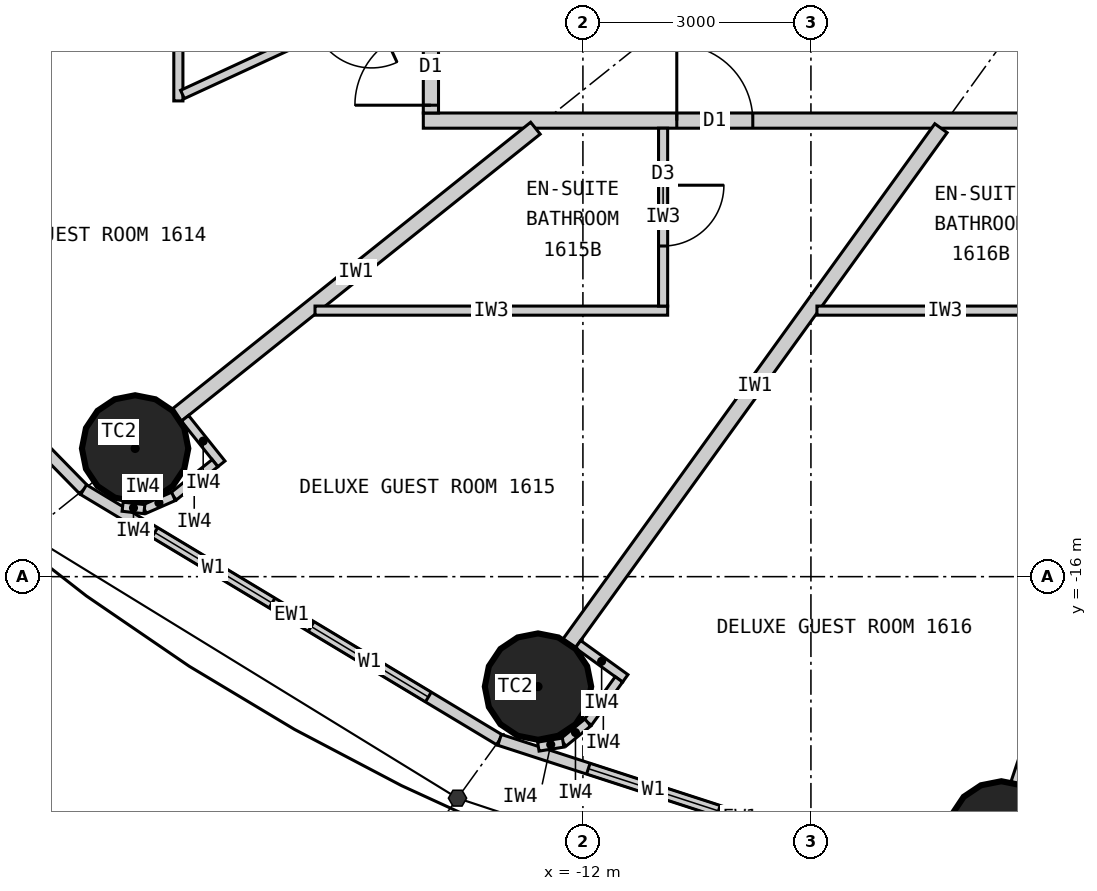
"""IFC4 building model, lengths in metres.
Left out: names, types, materials, properties, quantities, classifications, styles, units other than length and angle.
Written with IfcOpenShell. Run it as: python <this file> out.ifc"""

import sys

from ifc_helpers import new_model, si_unit, direction, frame, frame_2d, origin, origin_2d, place, context, subcontext, project, spatial, rectangle, circle, extrude, element, fill, save


model = new_model("IFC4")
c1 = context("Model", 3, precision=1e-05, world=origin(), true_north=direction((0.0, 1.0)))
c2 = subcontext(c1, "Body", "Model", "MODEL_VIEW")
j1 = project(units=[si_unit("LENGTHUNIT", "METRE"), si_unit("PLANEANGLEUNIT", "RADIAN")], contexts=[c1])
p1 = place(None, origin())
s1 = spatial("IfcSite", under=j1, at=p1, CompositionType="ELEMENT")
p2 = place(p1, origin())
s2 = spatial("IfcBuilding", under=s1, at=p2, CompositionType="ELEMENT")
p3 = place(p2, frame((0.0, 0.0, 67.2)))
s3 = spatial("IfcBuildingStorey", under=s2, at=p3, CompositionType="ELEMENT", Elevation=67.2)
for number, where, z_axis, x_axis in (
    (1, (-17.892, -14.313, 0.0), (0.0, 0.0, 1.0), (1.0, 0.0, 0.0)),
    (2, (-12.591, -17.447, 0.0), (0.0, 0.0, 1.0), (1.0, 0.0, 0.0)),
    (3, (-6.495, -19.391, 0.0), (0.0, 0.0, 1.0), (1.0, 0.0, 0.0)),
):
    element("IfcColumn", number, at=place(p3, frame(where, z_axis=z_axis, x_axis=x_axis)), inside=s3, PredefinedType="COLUMN", context=c2, shape_type="SweptSolid", body=[
        extrude(circle(Radius=0.7, at=origin_2d()), origin(), (0.0, 0.0, 1.0), 3.3),
    ])
p4 = place(p3, frame((-22.803, -10.532, 0.0), z_axis=(0.0, 0.0, 1.0), x_axis=(0.699602905915, -0.714531856557, 0.0)))
e4 = element("IfcWall", 4, at=p4, inside=s3, PredefinedType="ELEMENTEDWALL", context=c2, shape_type="SweptSolid", body=[
    extrude(rectangle(XDim=6.051, YDim=0.15, at=frame_2d((3.025, 0.0))), origin(), (0.0, 0.0, 1.0), 3.12),
])
p5 = place(p4, frame((0.926, 0.0, 0.9)))
e5 = element("IfcOpeningElement", 5, at=p5, cuts=e4, PredefinedType="OPENING", context=c2, shape_type="SweptSolid", body=[
    extrude(rectangle(XDim=1.8, YDim=1.9, at=frame_2d((0.9, 0.95))), frame((0.0, 0.085, 0.0), z_axis=(0.0, -1.0, 0.0), x_axis=(1.0, 0.0, 0.0)), (0.0, 0.0, 1.0), 0.17),
])
p6 = place(p4, frame((3.325, 0.0, 0.9)))
e6 = element("IfcOpeningElement", 6, at=p6, cuts=e4, PredefinedType="OPENING", context=c2, shape_type="SweptSolid", body=[
    extrude(rectangle(XDim=1.8, YDim=1.9, at=frame_2d((0.9, 0.95))), frame((0.0, 0.085, 0.0), z_axis=(0.0, -1.0, 0.0), x_axis=(1.0, 0.0, 0.0)), (0.0, 0.0, 1.0), 0.17),
])
p7 = place(p3, frame((-18.57, -14.856, 0.0), z_axis=(0.0, 0.0, 1.0), x_axis=(0.856983180864, -0.515344377787, 0.0)))
e7 = element("IfcWall", 7, at=p7, inside=s3, PredefinedType="ELEMENTEDWALL", context=c2, shape_type="SweptSolid", body=[
    extrude(rectangle(XDim=6.386, YDim=0.15, at=frame_2d((3.193, 0.0))), origin(), (0.0, 0.0, 1.0), 3.12),
])
p8 = place(p7, frame((1.093, 0.0, 0.9)))
e8 = element("IfcOpeningElement", 8, at=p8, cuts=e7, PredefinedType="OPENING", context=c2, shape_type="SweptSolid", body=[
    extrude(rectangle(XDim=1.8, YDim=1.9, at=frame_2d((0.9, 0.95))), frame((0.0, 0.085, 0.0), z_axis=(0.0, -1.0, 0.0), x_axis=(1.0, 0.0, 0.0)), (0.0, 0.0, 1.0), 0.17),
])
p9 = place(p7, frame((3.493, 0.0, 0.9)))
e9 = element("IfcOpeningElement", 9, at=p9, cuts=e7, PredefinedType="OPENING", context=c2, shape_type="SweptSolid", body=[
    extrude(rectangle(XDim=1.8, YDim=1.9, at=frame_2d((0.9, 0.95))), frame((0.0, 0.085, 0.0), z_axis=(0.0, -1.0, 0.0), x_axis=(1.0, 0.0, 0.0)), (0.0, 0.0, 1.0), 0.17),
])
p10 = place(p3, frame((-13.096, -18.147, 0.0), z_axis=(0.0, 0.0, 1.0), x_axis=(0.951137534625, -0.308767534285, 0.0)))
e10 = element("IfcWall", 10, at=p10, inside=s3, PredefinedType="ELEMENTEDWALL", context=c2, shape_type="SweptSolid", body=[
    extrude(rectangle(XDim=6.655, YDim=0.15, at=frame_2d((3.328, 0.0))), origin(), (0.0, 0.0, 1.0), 3.12),
])
p11 = place(p10, frame((1.228, 0.0, 0.9)))
e11 = element("IfcOpeningElement", 11, at=p11, cuts=e10, PredefinedType="OPENING", context=c2, shape_type="SweptSolid", body=[
    extrude(rectangle(XDim=1.8, YDim=1.9, at=frame_2d((0.9, 0.95))), frame((0.0, 0.085, 0.0), z_axis=(0.0, -1.0, 0.0), x_axis=(1.0, 0.0, 0.0)), (0.0, 0.0, 1.0), 0.17),
])
p12 = place(p10, frame((3.628, 0.0, 0.9)))
e12 = element("IfcOpeningElement", 12, at=p12, cuts=e10, PredefinedType="OPENING", context=c2, shape_type="SweptSolid", body=[
    extrude(rectangle(XDim=1.8, YDim=1.9, at=frame_2d((0.9, 0.95))), frame((0.0, 0.085, 0.0), z_axis=(0.0, -1.0, 0.0), x_axis=(1.0, 0.0, 0.0)), (0.0, 0.0, 1.0), 0.17),
])
p13 = place(p3, frame((14.1, -10.0, 0.0), z_axis=(0.0, 0.0, 1.0), x_axis=(-1.0, 0.0, 0.0)))
e13 = element("IfcWall", 13, at=p13, inside=s3, PredefinedType="PARTITIONING", context=c2, shape_type="SweptSolid", body=[
    extrude(rectangle(XDim=28.2, YDim=0.2, at=frame_2d((14.1, 0.0))), origin(), (0.0, 0.0, 1.0), 3.12),
])
p14 = place(p13, frame((23.865, 0.0, 0.0)))
e14 = element("IfcOpeningElement", 14, at=p14, cuts=e13, PredefinedType="OPENING", context=c2, shape_type="SweptSolid", body=[
    extrude(rectangle(XDim=1.0, YDim=2.2, at=frame_2d((0.5, 1.1))), frame((0.0, 0.11, 0.0), z_axis=(0.0, -1.0, 0.0), x_axis=(1.0, 0.0, 0.0)), (0.0, 0.0, 1.0), 0.22),
])
p15 = place(p13, frame((18.529, 0.0, 0.0)))
e15 = element("IfcOpeningElement", 15, at=p15, cuts=e13, PredefinedType="OPENING", context=c2, shape_type="SweptSolid", body=[
    extrude(rectangle(XDim=1.0, YDim=2.2, at=frame_2d((0.5, 1.1))), frame((0.0, 0.11, 0.0), z_axis=(0.0, -1.0, 0.0), x_axis=(1.0, 0.0, 0.0)), (0.0, 0.0, 1.0), 0.22),
])
p16 = place(p13, frame((14.623, 0.0, 0.0)))
e16 = element("IfcOpeningElement", 16, at=p16, cuts=e13, PredefinedType="OPENING", context=c2, shape_type="SweptSolid", body=[
    extrude(rectangle(XDim=1.0, YDim=2.2, at=frame_2d((0.5, 1.1))), frame((0.0, 0.11, 0.0), z_axis=(0.0, -1.0, 0.0), x_axis=(1.0, 0.0, 0.0)), (0.0, 0.0, 1.0), 0.22),
])
p17 = place(p13, frame((11.24, 0.0, 0.0)))
e17 = element("IfcOpeningElement", 17, at=p17, cuts=e13, PredefinedType="OPENING", context=c2, shape_type="SweptSolid", body=[
    extrude(rectangle(XDim=1.0, YDim=2.2, at=frame_2d((0.5, 1.1))), frame((0.0, 0.11, 0.0), z_axis=(0.0, -1.0, 0.0), x_axis=(1.0, 0.0, 0.0)), (0.0, 0.0, 1.0), 0.22),
])
p18 = place(p13, frame((8.671, 0.0, 0.0)))
e18 = element("IfcOpeningElement", 18, at=p18, cuts=e13, PredefinedType="OPENING", context=c2, shape_type="SweptSolid", body=[
    extrude(rectangle(XDim=1.0, YDim=2.2, at=frame_2d((0.5, 1.1))), frame((0.0, 0.11, 0.0), z_axis=(0.0, -1.0, 0.0), x_axis=(1.0, 0.0, 0.0)), (0.0, 0.0, 1.0), 0.22),
])
p19 = place(p13, frame((2.801, 0.0, 0.0)))
e19 = element("IfcOpeningElement", 19, at=p19, cuts=e13, PredefinedType="OPENING", context=c2, shape_type="SweptSolid", body=[
    extrude(rectangle(XDim=1.0, YDim=2.2, at=frame_2d((0.5, 1.1))), frame((0.0, 0.11, 0.0), z_axis=(0.0, -1.0, 0.0), x_axis=(1.0, 0.0, 0.0)), (0.0, 0.0, 1.0), 0.22),
])
p20 = place(p3, frame((-14.0, 9.9, 0.0), z_axis=(0.0, 0.0, 1.0), x_axis=(0.0, -1.0, 0.0)))
e20 = element("IfcWall", 20, at=p20, inside=s3, PredefinedType="PARTITIONING", context=c2, shape_type="SweptSolid", body=[
    extrude(rectangle(XDim=19.8, YDim=0.2, at=frame_2d((9.9, 0.0))), origin(), (0.0, 0.0, 1.0), 3.12),
])
p21 = place(p20, frame((0.103, 0.0, 0.0)))
e21 = element("IfcOpeningElement", 21, at=p21, cuts=e20, PredefinedType="OPENING", context=c2, shape_type="SweptSolid", body=[
    extrude(rectangle(XDim=1.0, YDim=2.2, at=frame_2d((0.5, 1.1))), frame((0.0, 0.11, 0.0), z_axis=(0.0, -1.0, 0.0), x_axis=(1.0, 0.0, 0.0)), (0.0, 0.0, 1.0), 0.22),
])
p22 = place(p20, frame((5.248, 0.0, 0.0)))
e22 = element("IfcOpeningElement", 22, at=p22, cuts=e20, PredefinedType="OPENING", context=c2, shape_type="SweptSolid", body=[
    extrude(rectangle(XDim=1.0, YDim=2.2, at=frame_2d((0.5, 1.1))), frame((0.0, 0.11, 0.0), z_axis=(0.0, -1.0, 0.0), x_axis=(1.0, 0.0, 0.0)), (0.0, 0.0, 1.0), 0.22),
])
p23 = place(p20, frame((9.438, 0.0, 0.0)))
e23 = element("IfcOpeningElement", 23, at=p23, cuts=e20, PredefinedType="OPENING", context=c2, shape_type="SweptSolid", body=[
    extrude(rectangle(XDim=1.0, YDim=2.2, at=frame_2d((0.5, 1.1))), frame((0.0, 0.11, 0.0), z_axis=(0.0, -1.0, 0.0), x_axis=(1.0, 0.0, 0.0)), (0.0, 0.0, 1.0), 0.22),
])
p24 = place(p20, frame((13.942, 0.0, 0.0)))
e24 = element("IfcOpeningElement", 24, at=p24, cuts=e20, PredefinedType="OPENING", context=c2, shape_type="SweptSolid", body=[
    extrude(rectangle(XDim=1.0, YDim=2.2, at=frame_2d((0.5, 1.1))), frame((0.0, 0.11, 0.0), z_axis=(0.0, -1.0, 0.0), x_axis=(1.0, 0.0, 0.0)), (0.0, 0.0, 1.0), 0.22),
])
p25 = place(p20, frame((18.698, 0.0, 0.0)))
e25 = element("IfcOpeningElement", 25, at=p25, cuts=e20, PredefinedType="OPENING", context=c2, shape_type="SweptSolid", body=[
    extrude(rectangle(XDim=1.0, YDim=2.2, at=frame_2d((0.5, 1.1))), frame((0.0, 0.11, 0.0), z_axis=(0.0, -1.0, 0.0), x_axis=(1.0, 0.0, 0.0)), (0.0, 0.0, 1.0), 0.22),
])
p26 = place(p3, frame((-14.1, -6.512, 0.0), z_axis=(0.0, 0.0, 1.0), x_axis=(-0.907832871056, -0.419332181247, 0.0)))
e26 = element("IfcWall", 26, at=p26, inside=s3, PredefinedType="PARTITIONING", context=c2, shape_type="SweptSolid", body=[
    extrude(rectangle(XDim=8.023, YDim=0.2, at=frame_2d((4.011, 0.0))), origin(), (0.0, 0.0, 1.0), 2.32),
])
p27 = place(p3, frame((-12.625, -10.1, 0.0), z_axis=(0.0, 0.0, 1.0), x_axis=(-0.780892451574, -0.624665493744, 0.0)))
e27 = element("IfcWall", 27, at=p27, inside=s3, PredefinedType="PARTITIONING", context=c2, shape_type="SweptSolid", body=[
    extrude(rectangle(XDim=6.045, YDim=0.2, at=frame_2d((3.022, 0.0))), origin(), (0.0, 0.0, 1.0), 2.32),
])
p28 = place(p3, frame((-7.289, -10.1, 0.0), z_axis=(0.0, 0.0, 1.0), x_axis=(-0.585198353053, -0.810890182197, 0.0)))
e28 = element("IfcWall", 28, at=p28, inside=s3, PredefinedType="PARTITIONING", context=c2, shape_type="SweptSolid", body=[
    extrude(rectangle(XDim=8.36, YDim=0.2, at=frame_2d((4.18, 0.0))), origin(), (0.0, 0.0, 1.0), 2.32),
])
p29 = place(p3, frame((-3.383, -10.1, 0.0), z_axis=(0.0, 0.0, 1.0), x_axis=(-0.31759592231, -0.948226149256, 0.0)))
e29 = element("IfcWall", 29, at=p29, inside=s3, PredefinedType="PARTITIONING", context=c2, shape_type="SweptSolid", body=[
    extrude(rectangle(XDim=9.098, YDim=0.2, at=frame_2d((4.549, 0.0))), origin(), (0.0, 0.0, 1.0), 2.32),
])
p30 = place(p3, frame((-17.323, -8.101, 0.0), z_axis=(0.0, 0.0, 1.0), x_axis=(0.0, -1.0, 0.0)))
e30 = element("IfcWall", 30, at=p30, inside=s3, PredefinedType="PARTITIONING", context=c2, shape_type="SweptSolid", body=[
    extrude(rectangle(XDim=1.64, YDim=0.12, at=frame_2d((0.82, 0.0))), origin(), (0.0, 0.0, 1.0), 3.12),
])
p31 = place(p3, frame((-14.1, -8.193, 0.0), z_axis=(0.0, 0.0, 1.0), x_axis=(-0.907836493557, -0.419324338628, 0.0)))
e31 = element("IfcWall", 31, at=p31, inside=s3, PredefinedType="PARTITIONING", context=c2, shape_type="SweptSolid", body=[
    extrude(rectangle(XDim=3.49, YDim=0.12, at=frame_2d((1.745, 0.0))), origin(), (0.0, 0.0, 1.0), 3.12),
])
p32 = place(p31, frame((0.75, 0.0, 0.0)))
e32 = element("IfcOpeningElement", 32, at=p32, cuts=e31, PredefinedType="OPENING", context=c2, shape_type="SweptSolid", body=[
    extrude(rectangle(XDim=0.8, YDim=2.1, at=frame_2d((0.4, 1.05))), frame((0.0, 0.07, 0.0), z_axis=(0.0, -1.0, 0.0), x_axis=(1.0, 0.0, 0.0)), (0.0, 0.0, 1.0), 0.14),
])
p33 = place(p3, frame((-15.525, -12.5, 0.0), z_axis=(0.0, 0.0, 1.0), x_axis=(1.0, 0.0, 0.0)))
e33 = element("IfcWall", 33, at=p33, inside=s3, PredefinedType="PARTITIONING", context=c2, shape_type="SweptSolid", body=[
    extrude(rectangle(XDim=4.64, YDim=0.12, at=frame_2d((2.32, 0.0))), origin(), (0.0, 0.0, 1.0), 3.12),
])
p34 = place(p3, frame((-10.945, -10.1, 0.0), z_axis=(0.0, 0.0, 1.0), x_axis=(0.0, -1.0, 0.0)))
e34 = element("IfcWall", 34, at=p34, inside=s3, PredefinedType="PARTITIONING", context=c2, shape_type="SweptSolid", body=[
    extrude(rectangle(XDim=2.34, YDim=0.12, at=frame_2d((1.17, 0.0))), origin(), (0.0, 0.0, 1.0), 3.12),
])
p35 = place(p34, frame((0.75, 0.0, 0.0)))
e35 = element("IfcOpeningElement", 35, at=p35, cuts=e34, PredefinedType="OPENING", context=c2, shape_type="SweptSolid", body=[
    extrude(rectangle(XDim=0.8, YDim=2.1, at=frame_2d((0.4, 1.05))), frame((0.0, 0.07, 0.0), z_axis=(0.0, -1.0, 0.0), x_axis=(1.0, 0.0, 0.0)), (0.0, 0.0, 1.0), 0.14),
])
p36 = place(p3, frame((-8.921, -12.5, 0.0), z_axis=(0.0, 0.0, 1.0), x_axis=(1.0, 0.0, 0.0)))
e36 = element("IfcWall", 36, at=p36, inside=s3, PredefinedType="PARTITIONING", context=c2, shape_type="SweptSolid", body=[
    extrude(rectangle(XDim=3.372, YDim=0.12, at=frame_2d((1.686, 0.0))), origin(), (0.0, 0.0, 1.0), 3.12),
])
p37 = place(p3, frame((-17.236, -13.917, 0.0), z_axis=(0.0, 0.0, 1.0), x_axis=(0.624695047554, -0.780868809443, 0.0)))
e37 = element("IfcWall", 37, at=p37, inside=s3, PredefinedType="PARTITIONING", context=c2, shape_type="SweptSolid", body=[
    extrude(rectangle(XDim=0.768, YDim=0.12, at=frame_2d((0.384, 0.0))), origin(), (0.0, 0.0, 1.0), 3.12),
])
p38 = place(p3, frame((-16.841, -14.507, 0.0), z_axis=(0.0, 0.0, 1.0), x_axis=(-0.780902834923, -0.62465251333, 0.0)))
e38 = element("IfcWall", 38, at=p38, inside=s3, PredefinedType="PARTITIONING", context=c2, shape_type="SweptSolid", body=[
    extrude(rectangle(XDim=0.7, YDim=0.12, at=frame_2d((0.35, 0.0))), origin(), (0.0, 0.0, 1.0), 3.12),
])
p39 = place(p3, frame((-17.387, -14.944, 0.0), z_axis=(0.0, 0.0, 1.0), x_axis=(-0.916036698064, -0.401094462441, 0.0)))
e39 = element("IfcWall", 39, at=p39, inside=s3, PredefinedType="PARTITIONING", context=c2, shape_type="SweptSolid", body=[
    extrude(rectangle(XDim=0.418, YDim=0.12, at=frame_2d((0.209, 0.0))), origin(), (0.0, 0.0, 1.0), 3.12),
])
p40 = place(p3, frame((-17.77, -15.112, 0.0), z_axis=(0.0, 0.0, 1.0), x_axis=(-0.993904401174, 0.110245368731, 0.0)))
e40 = element("IfcWall", 40, at=p40, inside=s3, PredefinedType="PARTITIONING", context=c2, shape_type="SweptSolid", body=[
    extrude(rectangle(XDim=0.288, YDim=0.12, at=frame_2d((0.144, 0.0))), origin(), (0.0, 0.0, 1.0), 3.12),
])
p41 = place(p3, frame((-12.065, -16.889, 0.0), z_axis=(0.0, 0.0, 1.0), x_axis=(0.810821798253, -0.585293098778, 0.0)))
e41 = element("IfcWall", 41, at=p41, inside=s3, PredefinedType="PARTITIONING", context=c2, shape_type="SweptSolid", body=[
    extrude(rectangle(XDim=0.768, YDim=0.12, at=frame_2d((0.384, 0.0))), origin(), (0.0, 0.0, 1.0), 3.12),
])
p42 = place(p3, frame((-11.526, -17.351, 0.0), z_axis=(0.0, 0.0, 1.0), x_axis=(-0.585223113993, -0.810872312296, 0.0)))
e42 = element("IfcWall", 42, at=p42, inside=s3, PredefinedType="PARTITIONING", context=c2, shape_type="SweptSolid", body=[
    extrude(rectangle(XDim=0.7, YDim=0.12, at=frame_2d((0.35, 0.0))), origin(), (0.0, 0.0, 1.0), 3.12),
])
p43 = place(p3, frame((-11.936, -17.919, 0.0), z_axis=(0.0, 0.0, 1.0), x_axis=(-0.775023088441, -0.631932917629, 0.0)))
e43 = element("IfcWall", 43, at=p43, inside=s3, PredefinedType="PARTITIONING", context=c2, shape_type="SweptSolid", body=[
    extrude(rectangle(XDim=0.418, YDim=0.12, at=frame_2d((0.209, 0.0))), origin(), (0.0, 0.0, 1.0), 3.12),
])
p44 = place(p3, frame((-12.26, -18.183, 0.0), z_axis=(0.0, 0.0, 1.0), x_axis=(-0.987218661664, -0.159371622511, 0.0)))
e44 = element("IfcWall", 44, at=p44, inside=s3, PredefinedType="PARTITIONING", context=c2, shape_type="SweptSolid", body=[
    extrude(rectangle(XDim=0.331, YDim=0.12, at=frame_2d((0.166, 0.0))), origin(), (0.0, 0.0, 1.0), 3.12),
])
p45 = place(p8, origin())
e45 = element("IfcWindow", 45, at=p45, inside=s3, PartitioningType="SINGLE_PANEL", PredefinedType="WINDOW", context=c2, shape_type="SweptSolid", body=[
    extrude(rectangle(XDim=1.8, YDim=1.9, at=frame_2d((0.9, 0.95))), frame((0.0, 0.03, 0.0), z_axis=(0.0, -1.0, 0.0), x_axis=(1.0, 0.0, 0.0)), (0.0, 0.0, 1.0), 0.06),
])
fill(e8, e45)
p46 = place(p9, origin())
e46 = element("IfcWindow", 46, at=p46, inside=s3, PartitioningType="SINGLE_PANEL", PredefinedType="WINDOW", context=c2, shape_type="SweptSolid", body=[
    extrude(rectangle(XDim=1.8, YDim=1.9, at=frame_2d((0.9, 0.95))), frame((0.0, 0.03, 0.0), z_axis=(0.0, -1.0, 0.0), x_axis=(1.0, 0.0, 0.0)), (0.0, 0.0, 1.0), 0.06),
])
fill(e9, e46)
p47 = place(p11, origin())
e47 = element("IfcWindow", 47, at=p47, inside=s3, PartitioningType="SINGLE_PANEL", PredefinedType="WINDOW", context=c2, shape_type="SweptSolid", body=[
    extrude(rectangle(XDim=1.8, YDim=1.9, at=frame_2d((0.9, 0.95))), frame((0.0, 0.03, 0.0), z_axis=(0.0, -1.0, 0.0), x_axis=(1.0, 0.0, 0.0)), (0.0, 0.0, 1.0), 0.06),
])
fill(e11, e47)
p48 = place(p25, origin())
e48 = element("IfcDoor", 48, at=p48, inside=s3, OperationType="SINGLE_SWING_RIGHT", PredefinedType="DOOR", context=c2, shape_type="SweptSolid", body=[
    extrude(rectangle(XDim=1.0, YDim=2.2, at=frame_2d((0.5, 1.1))), frame((0.0, 0.025, 0.0), z_axis=(0.0, -1.0, 0.0), x_axis=(1.0, 0.0, 0.0)), (0.0, 0.0, 1.0), 0.05),
])
fill(e25, e48)
p49 = place(p35, origin())
e49 = element("IfcDoor", 49, at=p49, inside=s3, OperationType="SINGLE_SWING_LEFT", PredefinedType="DOOR", context=c2, shape_type="SweptSolid", body=[
    extrude(rectangle(XDim=0.8, YDim=2.1, at=frame_2d((0.4, 1.05))), frame((0.0, 0.025, 0.0), z_axis=(0.0, -1.0, 0.0), x_axis=(1.0, 0.0, 0.0)), (0.0, 0.0, 1.0), 0.05),
])
fill(e35, e49)
p50 = place(p14, origin())
e50 = element("IfcDoor", 50, at=p50, inside=s3, OperationType="SINGLE_SWING_RIGHT", PredefinedType="DOOR", context=c2, shape_type="SweptSolid", body=[
    extrude(rectangle(XDim=1.0, YDim=2.2, at=frame_2d((0.5, 1.1))), frame((0.0, 0.025, 0.0), z_axis=(0.0, -1.0, 0.0), x_axis=(1.0, 0.0, 0.0)), (0.0, 0.0, 1.0), 0.05),
])
fill(e14, e50)
save(model, sys.argv[1])
